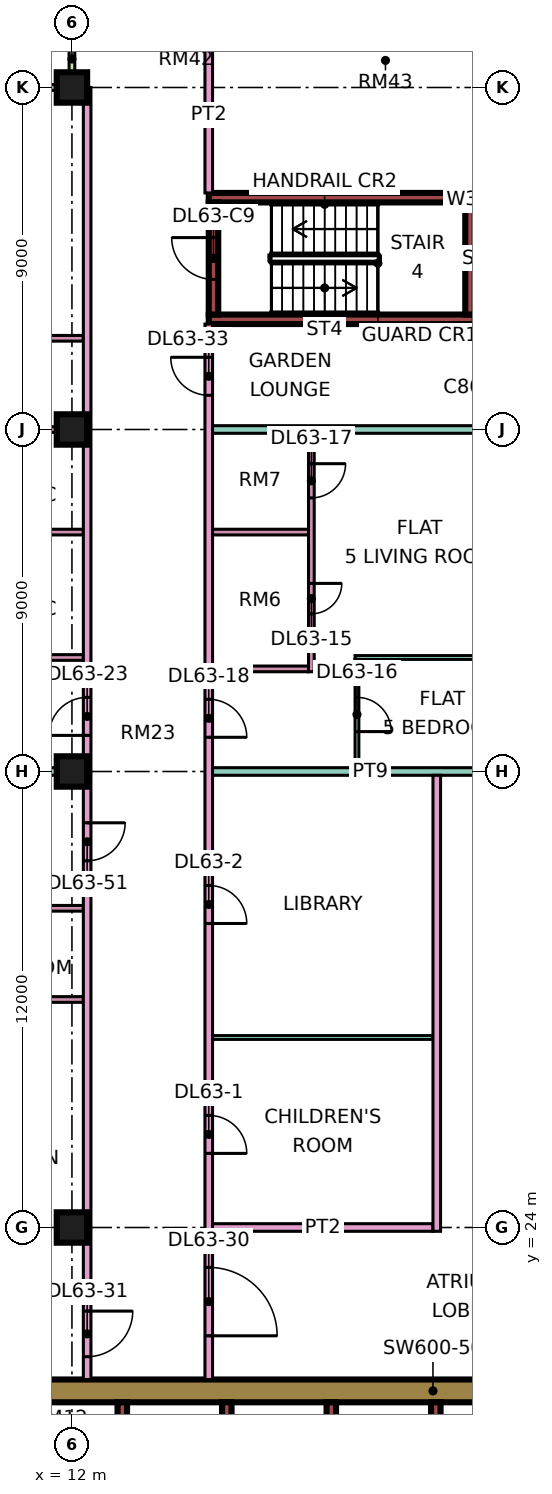
"""IFC4 building model, lengths in metres.
Left out: names, types, materials, properties, quantities, classifications, styles, units other than length and angle.
Written with IfcOpenShell. Run it as: python <this file> out.ifc"""

import sys

from ifc_helpers import new_model, si_unit, direction, frame, frame_2d, origin, origin_2d, place, context, subcontext, project, spatial, rectangle, extrude, element, fill, save


model = new_model("IFC4")
c1 = context("Model", 3, precision=1e-05, world=origin(), true_north=direction((0.0, 1.0)))
c2 = subcontext(c1, "Body", "Model", "MODEL_VIEW")
j1 = project(units=[si_unit("LENGTHUNIT", "METRE"), si_unit("PLANEANGLEUNIT", "RADIAN")], contexts=[c1])
p1 = place(None, origin())
s1 = spatial("IfcSite", under=j1, at=p1, CompositionType="ELEMENT")
p2 = place(p1, origin())
s2 = spatial("IfcBuilding", under=s1, at=p2, CompositionType="ELEMENT")
p3 = place(p2, frame((0.0, 0.0, 273.4)))
s3 = spatial("IfcBuildingStorey", under=s2, at=p3, CompositionType="ELEMENT", Elevation=273.4)
for number, where, z_axis, x_axis in (
    (1, (12.0, 24.0, 0.0), (0.0, 0.0, 1.0), (1.0, 0.0, 0.0)),
    (2, (12.0, 36.0, 0.0), (0.0, 0.0, 1.0), (1.0, 0.0, 0.0)),
    (3, (12.0, 45.0, 0.0), (0.0, 0.0, 1.0), (1.0, 0.0, 0.0)),
    (4, (12.0, 54.0, 0.0), (0.0, 0.0, 1.0), (1.0, 0.0, 0.0)),
):
    element("IfcColumn", number, at=place(p3, frame(where, z_axis=z_axis, x_axis=x_axis)), inside=s3, PredefinedType="COLUMN", context=c2, shape_type="SweptSolid", body=[
        extrude(rectangle(XDim=0.8, YDim=0.8, at=origin_2d()), origin(), (0.0, 0.0, 1.0), 3.75),
    ])
p4 = place(p3, frame((9.0, 19.7, 0.0), z_axis=(0.0, 0.0, 1.0), x_axis=(1.0, 0.0, 0.0)))
e5 = element("IfcWall", 5, at=p4, inside=s3, PredefinedType="SHEAR", context=c2, shape_type="SweptSolid", body=[
    extrude(rectangle(XDim=25.0, YDim=0.6, at=frame_2d((12.5, 0.0))), origin(), (0.0, 0.0, 1.0), 3.75),
])
p5 = place(p4, frame((19.1, 0.0, 0.0)))
e6 = element("IfcOpeningElement", 6, at=p5, cuts=e5, PredefinedType="OPENING", context=c2, shape_type="SweptSolid", body=[
    extrude(rectangle(XDim=1.8, YDim=2.4, at=frame_2d((0.9, 1.2))), frame((0.0, 0.31, 0.0), z_axis=(0.0, -1.0, 0.0), x_axis=(1.0, 0.0, 0.0)), (0.0, 0.0, 1.0), 0.62),
])
p6 = place(p3, frame((13.325, 7.6, 0.0), z_axis=(0.0, 0.0, 1.0), x_axis=(0.0, 1.0, 0.0)))
e7 = element("IfcWall", 7, at=p6, inside=s3, PredefinedType="SHEAR", context=c2, shape_type="SweptSolid", body=[
    extrude(rectangle(XDim=11.8, YDim=0.25, at=frame_2d((5.9, 0.0))), origin(), (0.0, 0.0, 1.0), 3.75),
])
for number, where, z_axis, x_axis in (
    (8, (16.075, 15.8, 0.0), (0.0, 0.0, 1.0), (0.0, 1.0, 0.0)),
    (9, (18.825, 15.8, 0.0), (0.0, 0.0, 1.0), (0.0, 1.0, 0.0)),
    (10, (21.575, 15.8, 0.0), (0.0, 0.0, 1.0), (0.0, 1.0, 0.0)),
):
    element("IfcWall", number, at=place(p3, frame(where, z_axis=z_axis, x_axis=x_axis)), inside=s3, PredefinedType="SHEAR", context=c2, shape_type="SweptSolid", body=[
        extrude(rectangle(XDim=3.6, YDim=0.25, at=frame_2d((1.8, 0.0))), origin(), (0.0, 0.0, 1.0), 3.75),
    ])
for number, where, z_axis, x_axis in (
    (11, (15.6, 47.9, 0.0), (0.0, 0.0, 1.0), (1.0, 0.0, 0.0)),
    (12, (15.6, 51.1, 0.0), (0.0, 0.0, 1.0), (1.0, 0.0, 0.0)),
):
    element("IfcWall", number, at=place(p3, frame(where, z_axis=z_axis, x_axis=x_axis)), inside=s3, PredefinedType="SHEAR", context=c2, shape_type="SweptSolid", body=[
        extrude(rectangle(XDim=7.0, YDim=0.25, at=frame_2d((3.5, 0.0))), origin(), (0.0, 0.0, 1.0), 3.75),
    ])
p7 = place(p3, frame((15.725, 48.025, 0.0), z_axis=(0.0, 0.0, 1.0), x_axis=(0.0, 1.0, 0.0)))
e13 = element("IfcWall", 13, at=p7, inside=s3, PredefinedType="SHEAR", context=c2, shape_type="SweptSolid", body=[
    extrude(rectangle(XDim=2.95, YDim=0.25, at=frame_2d((1.475, 0.0))), origin(), (0.0, 0.0, 1.0), 3.75),
])
p8 = place(p7, frame((0.925, 0.0, 0.0)))
e14 = element("IfcOpeningElement", 14, at=p8, cuts=e13, PredefinedType="OPENING", context=c2, shape_type="SweptSolid", body=[
    extrude(rectangle(XDim=1.1, YDim=2.2, at=frame_2d((0.55, 1.1))), frame((0.0, 0.135, 0.0), z_axis=(0.0, -1.0, 0.0), x_axis=(1.0, 0.0, 0.0)), (0.0, 0.0, 1.0), 0.27),
])
p9 = place(p3, frame((22.475, 48.025, 0.0), z_axis=(0.0, 0.0, 1.0), x_axis=(0.0, 1.0, 0.0)))
e15 = element("IfcWall", 15, at=p9, inside=s3, PredefinedType="SHEAR", context=c2, shape_type="SweptSolid", body=[
    extrude(rectangle(XDim=2.95, YDim=0.25, at=frame_2d((1.475, 0.0))), origin(), (0.0, 0.0, 1.0), 3.75),
])
p10 = place(p3, frame((25.447, 52.447, 0.0), z_axis=(0.0, 0.0, 1.0), x_axis=(-0.707106781187, 0.707106781187, 0.0)))
e16 = element("IfcWall", 16, at=p10, inside=s3, PredefinedType="SOLIDWALL", context=c2, shape_type="SweptSolid", body=[
    extrude(rectangle(XDim=4.243, YDim=0.15, at=frame_2d((2.121, 0.0))), origin(), (0.0, 0.0, 1.0), 3.35),
])
p11 = place(p10, frame((0.621, 0.0, 0.45)))
e17 = element("IfcOpeningElement", 17, at=p11, cuts=e16, PredefinedType="OPENING", context=c2, shape_type="SweptSolid", body=[
    extrude(rectangle(XDim=3.0, YDim=2.4, at=frame_2d((1.5, 1.2))), frame((0.0, 0.085, 0.0), z_axis=(0.0, -1.0, 0.0), x_axis=(1.0, 0.0, 0.0)), (0.0, 0.0, 1.0), 0.17),
])
p12 = place(p3, frame((11.925, 54.0, 0.0), z_axis=(0.0, 0.0, 1.0), x_axis=(-1.0, 0.0, 0.0)))
e18 = element("IfcWall", 18, at=p12, inside=s3, PredefinedType="SOLIDWALL", context=c2, shape_type="SweptSolid", body=[
    extrude(rectangle(XDim=10.35, YDim=0.15, at=frame_2d((5.175, 0.0))), origin(), (0.0, 0.0, 1.0), 3.35),
])
p13 = place(p12, frame((0.875, 0.0, 0.45)))
e19 = element("IfcOpeningElement", 19, at=p13, cuts=e18, PredefinedType="OPENING", context=c2, shape_type="SweptSolid", body=[
    extrude(rectangle(XDim=3.0, YDim=2.4, at=frame_2d((1.5, 1.2))), frame((0.0, 0.085, 0.0), z_axis=(0.0, -1.0, 0.0), x_axis=(1.0, 0.0, 0.0)), (0.0, 0.0, 1.0), 0.17),
])
p14 = place(p12, frame((7.038, 0.0, 0.0)))
e20 = element("IfcOpeningElement", 20, at=p14, cuts=e18, PredefinedType="OPENING", context=c2, shape_type="SweptSolid", body=[
    extrude(rectangle(XDim=1.8, YDim=2.4, at=frame_2d((0.9, 1.2))), frame((0.0, 0.085, 0.0), z_axis=(0.0, -1.0, 0.0), x_axis=(1.0, 0.0, 0.0)), (0.0, 0.0, 1.0), 0.17),
])
p15 = place(p3, frame((12.0, 55.5, 0.0), z_axis=(0.0, 0.0, 1.0), x_axis=(0.0, -1.0, 0.0)))
e21 = element("IfcWall", 21, at=p15, inside=s3, PredefinedType="SOLIDWALL", context=c2, shape_type="SweptSolid", body=[
    extrude(rectangle(XDim=1.5, YDim=0.15, at=frame_2d((0.75, 0.0))), origin(), (0.0, 0.0, 1.0), 3.35),
])
p16 = place(p3, frame((-1.35, 22.4, 0.0), z_axis=(0.0, 0.0, 1.0), x_axis=(1.0, 0.0, 0.0)))
e22 = element("IfcWall", 22, at=p16, inside=s3, PredefinedType="PARTITIONING", context=c2, shape_type="SweptSolid", body=[
    extrude(rectangle(XDim=13.65, YDim=0.2, at=frame_2d((6.825, 0.0))), origin(), (0.0, 0.0, 1.0), 3.35),
])
p17 = place(p3, frame((0.0, 36.0, 0.0), z_axis=(0.0, 0.0, 1.0), x_axis=(1.0, 0.0, 0.0)))
e23 = element("IfcWall", 23, at=p17, inside=s3, PredefinedType="PARTITIONING", context=c2, shape_type="SweptSolid", body=[
    extrude(rectangle(XDim=12.3, YDim=0.2, at=frame_2d((6.15, 0.0))), origin(), (0.0, 0.0, 1.0), 3.35),
])
for number, where, z_axis, x_axis in (
    (24, (7.675, 39.0, 0.0), (0.0, 0.0, 1.0), (1.0, 0.0, 0.0)),
    (25, (7.675, 42.3, 0.0), (0.0, 0.0, 1.0), (1.0, 0.0, 0.0)),
    (26, (7.675, 45.0, 0.0), (0.0, 0.0, 1.0), (1.0, 0.0, 0.0)),
    (27, (7.675, 47.4, 0.0), (0.0, 0.0, 1.0), (1.0, 0.0, 0.0)),
):
    element("IfcWall", number, at=place(p3, frame(where, z_axis=z_axis, x_axis=x_axis)), inside=s3, PredefinedType="PARTITIONING", context=c2, shape_type="SweptSolid", body=[
        extrude(rectangle(XDim=4.625, YDim=0.15, at=frame_2d((2.312, 0.0))), origin(), (0.0, 0.0, 1.0), 3.35),
    ])
for number, where, z_axis, x_axis in (
    (28, (8.275, 30.0, 0.0), (0.0, 0.0, 1.0), (1.0, 0.0, 0.0)),
    (29, (8.275, 32.4, 0.0), (0.0, 0.0, 1.0), (1.0, 0.0, 0.0)),
):
    element("IfcWall", number, at=place(p3, frame(where, z_axis=z_axis, x_axis=x_axis)), inside=s3, PredefinedType="PARTITIONING", context=c2, shape_type="SweptSolid", body=[
        extrude(rectangle(XDim=4.025, YDim=0.15, at=frame_2d((2.013, 0.0))), origin(), (0.0, 0.0, 1.0), 3.35),
    ])
p18 = place(p3, frame((12.4, 20.0, 0.0), z_axis=(0.0, 0.0, 1.0), x_axis=(0.0, 1.0, 0.0)))
e30 = element("IfcWall", 30, at=p18, inside=s3, PredefinedType="PARTITIONING", context=c2, shape_type="SweptSolid", body=[
    extrude(rectangle(XDim=34.0, YDim=0.2, at=frame_2d((17.0, 0.0))), origin(), (0.0, 0.0, 1.0), 3.35),
])
p19 = place(p18, frame((16.95, 0.0, 0.0)))
e31 = element("IfcOpeningElement", 31, at=p19, cuts=e30, PredefinedType="OPENING", context=c2, shape_type="SweptSolid", body=[
    extrude(rectangle(XDim=1.0, YDim=2.1, at=frame_2d((0.5, 1.05))), frame((0.0, 0.11, 0.0), z_axis=(0.0, -1.0, 0.0), x_axis=(1.0, 0.0, 0.0)), (0.0, 0.0, 1.0), 0.22),
])
p20 = place(p18, frame((0.6, 0.0, 0.0)))
e32 = element("IfcOpeningElement", 32, at=p20, cuts=e30, PredefinedType="OPENING", context=c2, shape_type="SweptSolid", body=[
    extrude(rectangle(XDim=1.2, YDim=2.1, at=frame_2d((0.6, 1.05))), frame((0.0, 0.11, 0.0), z_axis=(0.0, -1.0, 0.0), x_axis=(1.0, 0.0, 0.0)), (0.0, 0.0, 1.0), 0.22),
])
p21 = place(p18, frame((13.65, 0.0, 0.0)))
e33 = element("IfcOpeningElement", 33, at=p21, cuts=e30, PredefinedType="OPENING", context=c2, shape_type="SweptSolid", body=[
    extrude(rectangle(XDim=1.0, YDim=2.1, at=frame_2d((0.5, 1.05))), frame((0.0, 0.11, 0.0), z_axis=(0.0, -1.0, 0.0), x_axis=(1.0, 0.0, 0.0)), (0.0, 0.0, 1.0), 0.22),
])
p22 = place(p3, frame((15.6, 20.0, 0.0), z_axis=(0.0, 0.0, 1.0), x_axis=(0.0, 1.0, 0.0)))
e34 = element("IfcWall", 34, at=p22, inside=s3, PredefinedType="PARTITIONING", context=c2, shape_type="SweptSolid", body=[
    extrude(rectangle(XDim=27.775, YDim=0.2, at=frame_2d((13.887, 0.0))), origin(), (0.0, 0.0, 1.0), 3.35),
])
p23 = place(p22, frame((5.95, 0.0, 0.0)))
e35 = element("IfcOpeningElement", 35, at=p23, cuts=e34, PredefinedType="OPENING", context=c2, shape_type="SweptSolid", body=[
    extrude(rectangle(XDim=1.0, YDim=2.1, at=frame_2d((0.5, 1.05))), frame((0.0, 0.11, 0.0), z_axis=(0.0, -1.0, 0.0), x_axis=(1.0, 0.0, 0.0)), (0.0, 0.0, 1.0), 0.22),
])
p24 = place(p22, frame((12.0, 0.0, 0.0)))
e36 = element("IfcOpeningElement", 36, at=p24, cuts=e34, PredefinedType="OPENING", context=c2, shape_type="SweptSolid", body=[
    extrude(rectangle(XDim=1.0, YDim=2.1, at=frame_2d((0.5, 1.05))), frame((0.0, 0.11, 0.0), z_axis=(0.0, -1.0, 0.0), x_axis=(1.0, 0.0, 0.0)), (0.0, 0.0, 1.0), 0.22),
])
p25 = place(p22, frame((16.9, 0.0, 0.0)))
e37 = element("IfcOpeningElement", 37, at=p25, cuts=e34, PredefinedType="OPENING", context=c2, shape_type="SweptSolid", body=[
    extrude(rectangle(XDim=1.0, YDim=2.1, at=frame_2d((0.5, 1.05))), frame((0.0, 0.11, 0.0), z_axis=(0.0, -1.0, 0.0), x_axis=(1.0, 0.0, 0.0)), (0.0, 0.0, 1.0), 0.22),
])
p26 = place(p22, frame((1.15, 0.0, 0.0)))
e38 = element("IfcOpeningElement", 38, at=p26, cuts=e34, PredefinedType="OPENING", context=c2, shape_type="SweptSolid", body=[
    extrude(rectangle(XDim=1.8, YDim=2.1, at=frame_2d((0.9, 1.05))), frame((0.0, 0.11, 0.0), z_axis=(0.0, -1.0, 0.0), x_axis=(1.0, 0.0, 0.0)), (0.0, 0.0, 1.0), 0.22),
])
p27 = place(p22, frame((25.9, 0.0, 0.0)))
e39 = element("IfcOpeningElement", 39, at=p27, cuts=e34, PredefinedType="OPENING", context=c2, shape_type="SweptSolid", body=[
    extrude(rectangle(XDim=1.0, YDim=2.1, at=frame_2d((0.5, 1.05))), frame((0.0, 0.11, 0.0), z_axis=(0.0, -1.0, 0.0), x_axis=(1.0, 0.0, 0.0)), (0.0, 0.0, 1.0), 0.22),
])
p28 = place(p3, frame((15.6, 51.225, 0.0), z_axis=(0.0, 0.0, 1.0), x_axis=(0.0, 1.0, 0.0)))
e40 = element("IfcWall", 40, at=p28, inside=s3, PredefinedType="PARTITIONING", context=c2, shape_type="SweptSolid", body=[
    extrude(rectangle(XDim=4.125, YDim=0.2, at=frame_2d((2.062, 0.0))), origin(), (0.0, 0.0, 1.0), 3.35),
])
p29 = place(p3, frame((15.7, 24.0, 0.0), z_axis=(0.0, 0.0, 1.0), x_axis=(1.0, 0.0, 0.0)))
e41 = element("IfcWall", 41, at=p29, inside=s3, PredefinedType="PARTITIONING", context=c2, shape_type="SweptSolid", body=[
    extrude(rectangle(XDim=5.8, YDim=0.2, at=frame_2d((2.9, 0.0))), origin(), (0.0, 0.0, 1.0), 3.35),
])
p30 = place(p3, frame((15.7, 29.0, 0.0), z_axis=(0.0, 0.0, 1.0), x_axis=(1.0, 0.0, 0.0)))
e42 = element("IfcWall", 42, at=p30, inside=s3, PredefinedType="PARTITIONING", context=c2, shape_type="SweptSolid", body=[
    extrude(rectangle(XDim=5.8, YDim=0.1, at=frame_2d((2.9, 0.0))), origin(), (0.0, 0.0, 1.0), 3.35),
])
p31 = place(p3, frame((15.7, 36.0, 0.0), z_axis=(0.0, 0.0, 1.0), x_axis=(1.0, 0.0, 0.0)))
e43 = element("IfcWall", 43, at=p31, inside=s3, PredefinedType="PARTITIONING", context=c2, shape_type="SweptSolid", body=[
    extrude(rectangle(XDim=8.3, YDim=0.2, at=frame_2d((4.15, 0.0))), origin(), (0.0, 0.0, 1.0), 3.35),
])
for number, where, z_axis, x_axis in (
    (44, (15.7, 38.7, 0.0), (0.0, 0.0, 1.0), (1.0, 0.0, 0.0)),
    (45, (15.7, 42.3, 0.0), (0.0, 0.0, 1.0), (1.0, 0.0, 0.0)),
):
    element("IfcWall", number, at=place(p3, frame(where, z_axis=z_axis, x_axis=x_axis)), inside=s3, PredefinedType="PARTITIONING", context=c2, shape_type="SweptSolid", body=[
        extrude(rectangle(XDim=2.525, YDim=0.15, at=frame_2d((1.263, 0.0))), origin(), (0.0, 0.0, 1.0), 3.35),
    ])
p32 = place(p3, frame((15.7, 45.0, 0.0), z_axis=(0.0, 0.0, 1.0), x_axis=(1.0, 0.0, 0.0)))
e46 = element("IfcWall", 46, at=p32, inside=s3, PredefinedType="PARTITIONING", context=c2, shape_type="SweptSolid", body=[
    extrude(rectangle(XDim=8.3, YDim=0.2, at=frame_2d((4.15, 0.0))), origin(), (0.0, 0.0, 1.0), 3.35),
])
p33 = place(p3, frame((18.3, 38.625, 0.0), z_axis=(0.0, 0.0, 1.0), x_axis=(0.0, 1.0, 0.0)))
e47 = element("IfcWall", 47, at=p33, inside=s3, PredefinedType="PARTITIONING", context=c2, shape_type="SweptSolid", body=[
    extrude(rectangle(XDim=6.275, YDim=0.15, at=frame_2d((3.137, 0.0))), origin(), (0.0, 0.0, 1.0), 3.35),
])
p34 = place(p33, frame((1.525, 0.0, 0.0)))
e48 = element("IfcOpeningElement", 48, at=p34, cuts=e47, PredefinedType="OPENING", context=c2, shape_type="SweptSolid", body=[
    extrude(rectangle(XDim=0.8, YDim=2.1, at=frame_2d((0.4, 1.05))), frame((0.0, 0.085, 0.0), z_axis=(0.0, -1.0, 0.0), x_axis=(1.0, 0.0, 0.0)), (0.0, 0.0, 1.0), 0.17),
])
p35 = place(p33, frame((4.575, 0.0, 0.0)))
e49 = element("IfcOpeningElement", 49, at=p35, cuts=e47, PredefinedType="OPENING", context=c2, shape_type="SweptSolid", body=[
    extrude(rectangle(XDim=0.9, YDim=2.1, at=frame_2d((0.45, 1.05))), frame((0.0, 0.085, 0.0), z_axis=(0.0, -1.0, 0.0), x_axis=(1.0, 0.0, 0.0)), (0.0, 0.0, 1.0), 0.17),
])
p36 = place(p3, frame((19.45, 39.0, 0.0), z_axis=(0.0, 0.0, 1.0), x_axis=(1.0, 0.0, 0.0)))
e50 = element("IfcWall", 50, at=p36, inside=s3, PredefinedType="PARTITIONING", context=c2, shape_type="SweptSolid", body=[
    extrude(rectangle(XDim=4.55, YDim=0.1, at=frame_2d((2.275, 0.0))), origin(), (0.0, 0.0, 1.0), 3.35),
])
p37 = place(p3, frame((19.5, 36.1, 0.0), z_axis=(0.0, 0.0, 1.0), x_axis=(0.0, 1.0, 0.0)))
e51 = element("IfcWall", 51, at=p37, inside=s3, PredefinedType="PARTITIONING", context=c2, shape_type="SweptSolid", body=[
    extrude(rectangle(XDim=2.85, YDim=0.1, at=frame_2d((1.425, 0.0))), origin(), (0.0, 0.0, 1.0), 3.35),
])
p38 = place(p37, frame((0.95, 0.0, 0.0)))
e52 = element("IfcOpeningElement", 52, at=p38, cuts=e51, PredefinedType="OPENING", context=c2, shape_type="SweptSolid", body=[
    extrude(rectangle(XDim=0.9, YDim=2.1, at=frame_2d((0.45, 1.05))), frame((0.0, 0.06, 0.0), z_axis=(0.0, -1.0, 0.0), x_axis=(1.0, 0.0, 0.0)), (0.0, 0.0, 1.0), 0.12),
])
p39 = place(p3, frame((21.6, 23.9, 0.0), z_axis=(0.0, 0.0, 1.0), x_axis=(0.0, 1.0, 0.0)))
e53 = element("IfcWall", 53, at=p39, inside=s3, PredefinedType="PARTITIONING", context=c2, shape_type="SweptSolid", body=[
    extrude(rectangle(XDim=12.0, YDim=0.2, at=frame_2d((6.0, 0.0))), origin(), (0.0, 0.0, 1.0), 3.35),
])
p40 = place(p8, frame((1.1, 0.0, 0.0), z_axis=(0.0, 0.0, 1.0), x_axis=(-1.0, 0.0, 0.0)))
e54 = element("IfcDoor", 54, at=p40, inside=s3, OperationType="SINGLE_SWING_RIGHT", PredefinedType="DOOR", context=c2, shape_type="SweptSolid", body=[
    extrude(rectangle(XDim=1.1, YDim=2.2, at=frame_2d((0.55, 1.1))), frame((0.0, 0.025, 0.0), z_axis=(0.0, -1.0, 0.0), x_axis=(1.0, 0.0, 0.0)), (0.0, 0.0, 1.0), 0.05),
])
fill(e14, e54)
p41 = place(p23, frame((1.0, 0.0, 0.0), z_axis=(0.0, 0.0, 1.0), x_axis=(-1.0, 0.0, 0.0)))
e55 = element("IfcDoor", 55, at=p41, inside=s3, OperationType="SINGLE_SWING_LEFT", PredefinedType="DOOR", context=c2, shape_type="SweptSolid", body=[
    extrude(rectangle(XDim=1.0, YDim=2.1, at=frame_2d((0.5, 1.05))), frame((0.0, 0.025, 0.0), z_axis=(0.0, -1.0, 0.0), x_axis=(1.0, 0.0, 0.0)), (0.0, 0.0, 1.0), 0.05),
])
fill(e35, e55)
p42 = place(p24, frame((1.0, 0.0, 0.0), z_axis=(0.0, 0.0, 1.0), x_axis=(-1.0, 0.0, 0.0)))
e56 = element("IfcDoor", 56, at=p42, inside=s3, OperationType="SINGLE_SWING_LEFT", PredefinedType="DOOR", context=c2, shape_type="SweptSolid", body=[
    extrude(rectangle(XDim=1.0, YDim=2.1, at=frame_2d((0.5, 1.05))), frame((0.0, 0.025, 0.0), z_axis=(0.0, -1.0, 0.0), x_axis=(1.0, 0.0, 0.0)), (0.0, 0.0, 1.0), 0.05),
])
fill(e36, e56)
p43 = place(p34, origin())
e57 = element("IfcDoor", 57, at=p43, inside=s3, OperationType="SINGLE_SWING_RIGHT", PredefinedType="DOOR", context=c2, shape_type="SweptSolid", body=[
    extrude(rectangle(XDim=0.8, YDim=2.1, at=frame_2d((0.4, 1.05))), frame((0.0, 0.025, 0.0), z_axis=(0.0, -1.0, 0.0), x_axis=(1.0, 0.0, 0.0)), (0.0, 0.0, 1.0), 0.05),
])
fill(e48, e57)
p44 = place(p38, frame((0.9, 0.0, 0.0), z_axis=(0.0, 0.0, 1.0), x_axis=(-1.0, 0.0, 0.0)))
e58 = element("IfcDoor", 58, at=p44, inside=s3, OperationType="SINGLE_SWING_LEFT", PredefinedType="DOOR", context=c2, shape_type="SweptSolid", body=[
    extrude(rectangle(XDim=0.9, YDim=2.1, at=frame_2d((0.45, 1.05))), frame((0.0, 0.025, 0.0), z_axis=(0.0, -1.0, 0.0), x_axis=(1.0, 0.0, 0.0)), (0.0, 0.0, 1.0), 0.05),
])
fill(e52, e58)
p45 = place(p35, origin())
e59 = element("IfcDoor", 59, at=p45, inside=s3, OperationType="SINGLE_SWING_RIGHT", PredefinedType="DOOR", context=c2, shape_type="SweptSolid", body=[
    extrude(rectangle(XDim=0.9, YDim=2.1, at=frame_2d((0.45, 1.05))), frame((0.0, 0.025, 0.0), z_axis=(0.0, -1.0, 0.0), x_axis=(1.0, 0.0, 0.0)), (0.0, 0.0, 1.0), 0.05),
])
fill(e49, e59)
p46 = place(p25, frame((1.0, 0.0, 0.0), z_axis=(0.0, 0.0, 1.0), x_axis=(-1.0, 0.0, 0.0)))
e60 = element("IfcDoor", 60, at=p46, inside=s3, OperationType="SINGLE_SWING_LEFT", PredefinedType="DOOR", context=c2, shape_type="SweptSolid", body=[
    extrude(rectangle(XDim=1.0, YDim=2.1, at=frame_2d((0.5, 1.05))), frame((0.0, 0.025, 0.0), z_axis=(0.0, -1.0, 0.0), x_axis=(1.0, 0.0, 0.0)), (0.0, 0.0, 1.0), 0.05),
])
fill(e37, e60)
p47 = place(p19, origin())
e61 = element("IfcDoor", 61, at=p47, inside=s3, OperationType="SINGLE_SWING_LEFT", PredefinedType="DOOR", context=c2, shape_type="SweptSolid", body=[
    extrude(rectangle(XDim=1.0, YDim=2.1, at=frame_2d((0.5, 1.05))), frame((0.0, 0.025, 0.0), z_axis=(0.0, -1.0, 0.0), x_axis=(1.0, 0.0, 0.0)), (0.0, 0.0, 1.0), 0.05),
])
fill(e31, e61)
p48 = place(p26, frame((1.8, 0.0, 0.0), z_axis=(0.0, 0.0, 1.0), x_axis=(-1.0, 0.0, 0.0)))
e62 = element("IfcDoor", 62, at=p48, inside=s3, OperationType="DOUBLE_DOOR_SINGLE_SWING", PredefinedType="DOOR", context=c2, shape_type="SweptSolid", body=[
    extrude(rectangle(XDim=1.8, YDim=2.1, at=frame_2d((0.9, 1.05))), frame((0.0, 0.025, 0.0), z_axis=(0.0, -1.0, 0.0), x_axis=(1.0, 0.0, 0.0)), (0.0, 0.0, 1.0), 0.05),
])
fill(e38, e62)
p49 = place(p20, origin())
e63 = element("IfcDoor", 63, at=p49, inside=s3, OperationType="SINGLE_SWING_RIGHT", PredefinedType="DOOR", context=c2, shape_type="SweptSolid", body=[
    extrude(rectangle(XDim=1.2, YDim=2.1, at=frame_2d((0.6, 1.05))), frame((0.0, 0.025, 0.0), z_axis=(0.0, -1.0, 0.0), x_axis=(1.0, 0.0, 0.0)), (0.0, 0.0, 1.0), 0.05),
])
fill(e32, e63)
p50 = place(p27, frame((1.0, 0.0, 0.0), z_axis=(0.0, 0.0, 1.0), x_axis=(-1.0, 0.0, 0.0)))
e64 = element("IfcDoor", 64, at=p50, inside=s3, OperationType="SINGLE_SWING_RIGHT", PredefinedType="DOOR", context=c2, shape_type="SweptSolid", body=[
    extrude(rectangle(XDim=1.0, YDim=2.1, at=frame_2d((0.5, 1.05))), frame((0.0, 0.025, 0.0), z_axis=(0.0, -1.0, 0.0), x_axis=(1.0, 0.0, 0.0)), (0.0, 0.0, 1.0), 0.05),
])
fill(e39, e64)
p51 = place(p21, origin())
e65 = element("IfcDoor", 65, at=p51, inside=s3, OperationType="SINGLE_SWING_RIGHT", PredefinedType="DOOR", context=c2, shape_type="SweptSolid", body=[
    extrude(rectangle(XDim=1.0, YDim=2.1, at=frame_2d((0.5, 1.05))), frame((0.0, 0.025, 0.0), z_axis=(0.0, -1.0, 0.0), x_axis=(1.0, 0.0, 0.0)), (0.0, 0.0, 1.0), 0.05),
])
fill(e33, e65)
save(model, sys.argv[1])
